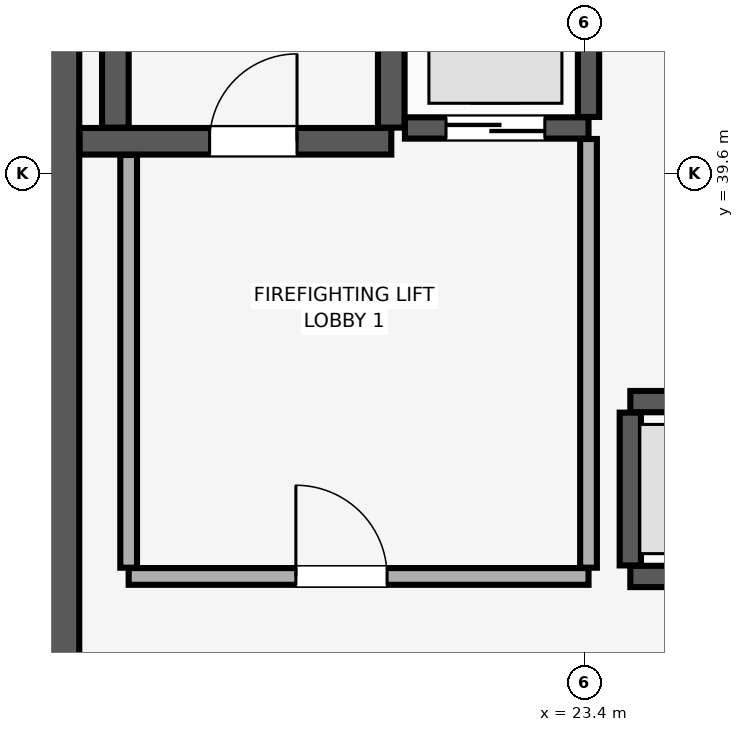
"""IFC4 building model, lengths in metres.
Left out: names, types, materials, properties, quantities, classifications, styles, units other than length and angle.
Written with IfcOpenShell. Run it as: python <this file> out.ifc"""

import sys

from ifc_helpers import new_model, si_unit, direction, frame, frame_2d, origin, place, context, subcontext, project, spatial, rectangle, extrude, element, fill, save


model = new_model("IFC4")
c1 = context("Model", 3, precision=1e-05, world=origin(), true_north=direction((0.0, 1.0)))
c2 = subcontext(c1, "Body", "Model", "MODEL_VIEW")
j1 = project(units=[si_unit("LENGTHUNIT", "METRE"), si_unit("PLANEANGLEUNIT", "RADIAN")], contexts=[c1])
p1 = place(None, origin())
s1 = spatial("IfcSite", under=j1, at=p1, CompositionType="ELEMENT")
p2 = place(p1, origin())
s2 = spatial("IfcBuilding", under=s1, at=p2, CompositionType="ELEMENT")
p3 = place(p2, frame((0.0, 0.0, 68.9)))
s3 = spatial("IfcBuildingStorey", under=s2, at=p3, CompositionType="ELEMENT", Elevation=68.9)
p4 = place(p3, frame((16.2, 29.4, 0.0), z_axis=(0.0, 0.0, 1.0), x_axis=(0.0, 1.0, 0.0)))
e1 = element("IfcWall", 1, at=p4, inside=s3, PredefinedType="SHEAR", context=c2, shape_type="SweptSolid", body=[
    extrude(rectangle(XDim=19.2, YDim=1.1, at=frame_2d((9.6, 0.0))), origin(), (0.0, 0.0, 1.0), 3.51),
])
p5 = place(p3, frame((16.755, 40.025, 0.0), z_axis=(0.0, 0.0, 1.0), x_axis=(1.0, 0.0, 0.0)))
e2 = element("IfcWall", 2, at=p5, inside=s3, PredefinedType="SHEAR", context=c2, shape_type="SweptSolid", body=[
    extrude(rectangle(XDim=4.1, YDim=0.35, at=frame_2d((2.05, 0.0))), origin(), (0.0, 0.0, 1.0), 3.51),
])
p6 = place(p5, frame((1.71, 0.0, 0.0)))
e3 = element("IfcOpeningElement", 3, at=p6, cuts=e2, PredefinedType="OPENING", context=c2, shape_type="SweptSolid", body=[
    extrude(rectangle(XDim=1.15, YDim=2.15, at=frame_2d((0.575, 1.075))), frame((0.0, 0.185, 0.0), z_axis=(0.0, -1.0, 0.0), x_axis=(1.0, 0.0, 0.0)), (0.0, 0.0, 1.0), 0.37),
])
for number, where, z_axis, x_axis in (
    (4, (17.225, 40.205, 0.0), (0.0, 0.0, 1.0), (0.0, 1.0, 0.0)),
    (5, (20.855, 40.205, 0.0), (0.0, 0.0, 1.0), (0.0, 1.0, 0.0)),
):
    element("IfcWall", number, at=place(p3, frame(where, z_axis=z_axis, x_axis=x_axis)), inside=s3, PredefinedType="SHEAR", context=c2, shape_type="SweptSolid", body=[
        extrude(rectangle(XDim=8.09, YDim=0.35, at=frame_2d((4.045, 0.0))), origin(), (0.0, 0.0, 1.0), 3.51),
    ])
p7 = place(p3, frame((24.0, 34.3, 0.0), z_axis=(0.0, 0.0, 1.0), x_axis=(1.0, 0.0, 0.0)))
e6 = element("IfcWall", 6, at=p7, inside=s3, PredefinedType="SHEAR", context=c2, shape_type="SweptSolid", body=[
    extrude(rectangle(XDim=2.3, YDim=0.28, at=frame_2d((1.15, 0.0))), origin(), (0.0, 0.0, 1.0), 3.51),
])
p8 = place(p7, frame((0.6, 0.0, 0.0)))
e7 = element("IfcOpeningElement", 7, at=p8, cuts=e6, PredefinedType="OPENING", context=c2, shape_type="SweptSolid", body=[
    extrude(rectangle(XDim=1.1, YDim=2.2, at=frame_2d((0.55, 1.1))), frame((0.0, 0.15, 0.0), z_axis=(0.0, -1.0, 0.0), x_axis=(1.0, 0.0, 0.0)), (0.0, 0.0, 1.0), 0.3),
])
p9 = place(p3, frame((24.0, 36.6, 0.0), z_axis=(0.0, 0.0, 1.0), x_axis=(1.0, 0.0, 0.0)))
e8 = element("IfcWall", 8, at=p9, inside=s3, PredefinedType="SHEAR", context=c2, shape_type="SweptSolid", body=[
    extrude(rectangle(XDim=2.3, YDim=0.28, at=frame_2d((1.15, 0.0))), origin(), (0.0, 0.0, 1.0), 3.51),
])
p10 = place(p3, frame((24.0, 34.445, 0.0), z_axis=(0.0, 0.0, 1.0), x_axis=(0.0, 1.0, 0.0)))
e9 = element("IfcWall", 9, at=p10, inside=s3, PredefinedType="SHEAR", context=c2, shape_type="SweptSolid", body=[
    extrude(rectangle(XDim=2.01, YDim=0.28, at=frame_2d((1.005, 0.0))), origin(), (0.0, 0.0, 1.0), 3.51),
])
p11 = place(p3, frame((21.035, 40.2, 0.0), z_axis=(0.0, 0.0, 1.0), x_axis=(1.0, 0.0, 0.0)))
e10 = element("IfcWall", 10, at=p11, inside=s3, PredefinedType="SHEAR", context=c2, shape_type="SweptSolid", body=[
    extrude(rectangle(XDim=2.415, YDim=0.28, at=frame_2d((1.208, 0.0))), origin(), (0.0, 0.0, 1.0), 3.51),
])
p12 = place(p11, frame((0.54, 0.0, 0.0)))
e11 = element("IfcOpeningElement", 11, at=p12, cuts=e10, PredefinedType="OPENING", context=c2, shape_type="SweptSolid", body=[
    extrude(rectangle(XDim=1.3, YDim=2.3, at=frame_2d((0.65, 1.15))), frame((0.0, 0.15, 0.0), z_axis=(0.0, -1.0, 0.0), x_axis=(1.0, 0.0, 0.0)), (0.0, 0.0, 1.0), 0.3),
])
p13 = place(p3, frame((23.45, 40.345, 0.0), z_axis=(0.0, 0.0, 1.0), x_axis=(0.0, 1.0, 0.0)))
e12 = element("IfcWall", 12, at=p13, inside=s3, PredefinedType="SHEAR", context=c2, shape_type="SweptSolid", body=[
    extrude(rectangle(XDim=2.81, YDim=0.28, at=frame_2d((1.405, 0.0))), origin(), (0.0, 0.0, 1.0), 3.51),
])
p14 = place(p3, frame((17.4, 34.3, 0.0), z_axis=(0.0, 0.0, 1.0), x_axis=(1.0, 0.0, 0.0)))
e13 = element("IfcWall", 13, at=p14, inside=s3, PredefinedType="PARTITIONING", context=c2, shape_type="SweptSolid", body=[
    extrude(rectangle(XDim=6.05, YDim=0.22, at=frame_2d((3.025, 0.0))), origin(), (0.0, 0.0, 1.0), 3.51),
])
p15 = place(p14, frame((2.2, 0.0, 0.0)))
e14 = element("IfcOpeningElement", 14, at=p15, cuts=e13, PredefinedType="OPENING", context=c2, shape_type="SweptSolid", body=[
    extrude(rectangle(XDim=1.2, YDim=2.15, at=frame_2d((0.6, 1.075))), frame((0.0, 0.12, 0.0), z_axis=(0.0, -1.0, 0.0), x_axis=(1.0, 0.0, 0.0)), (0.0, 0.0, 1.0), 0.24),
])
p16 = place(p3, frame((17.4, 34.415, 0.0), z_axis=(0.0, 0.0, 1.0), x_axis=(0.0, 1.0, 0.0)))
e15 = element("IfcWall", 15, at=p16, inside=s3, PredefinedType="PARTITIONING", context=c2, shape_type="SweptSolid", body=[
    extrude(rectangle(XDim=5.43, YDim=0.22, at=frame_2d((2.715, 0.0))), origin(), (0.0, 0.0, 1.0), 3.51),
])
p17 = place(p3, frame((23.45, 34.415, 0.0), z_axis=(0.0, 0.0, 1.0), x_axis=(0.0, 1.0, 0.0)))
e16 = element("IfcWall", 16, at=p17, inside=s3, PredefinedType="PARTITIONING", context=c2, shape_type="SweptSolid", body=[
    extrude(rectangle(XDim=5.64, YDim=0.22, at=frame_2d((2.82, 0.0))), origin(), (0.0, 0.0, 1.0), 3.51),
])
p18 = place(p6, origin())
e17 = element("IfcDoor", 17, at=p18, inside=s3, OperationType="SINGLE_SWING_RIGHT", PredefinedType="DOOR", context=c2, shape_type="SweptSolid", body=[
    extrude(rectangle(XDim=1.15, YDim=2.15, at=frame_2d((0.575, 1.075))), frame((0.0, 0.025, 0.0), z_axis=(0.0, -1.0, 0.0), x_axis=(1.0, 0.0, 0.0)), (0.0, 0.0, 1.0), 0.05),
])
fill(e3, e17)
p19 = place(p12, origin())
e18 = element("IfcDoor", 18, at=p19, inside=s3, OperationType="DOUBLE_DOOR_SLIDING", PredefinedType="DOOR", context=c2, shape_type="SweptSolid", body=[
    extrude(rectangle(XDim=1.3, YDim=2.3, at=frame_2d((0.65, 1.15))), frame((0.0, 0.025, 0.0), z_axis=(0.0, -1.0, 0.0), x_axis=(1.0, 0.0, 0.0)), (0.0, 0.0, 1.0), 0.05),
])
fill(e11, e18)
p20 = place(p15, origin())
e19 = element("IfcDoor", 19, at=p20, inside=s3, OperationType="SINGLE_SWING_LEFT", PredefinedType="DOOR", context=c2, shape_type="SweptSolid", body=[
    extrude(rectangle(XDim=1.2, YDim=2.15, at=frame_2d((0.6, 1.075))), frame((0.0, 0.025, 0.0), z_axis=(0.0, -1.0, 0.0), x_axis=(1.0, 0.0, 0.0)), (0.0, 0.0, 1.0), 0.05),
])
fill(e14, e19)
save(model, sys.argv[1])
